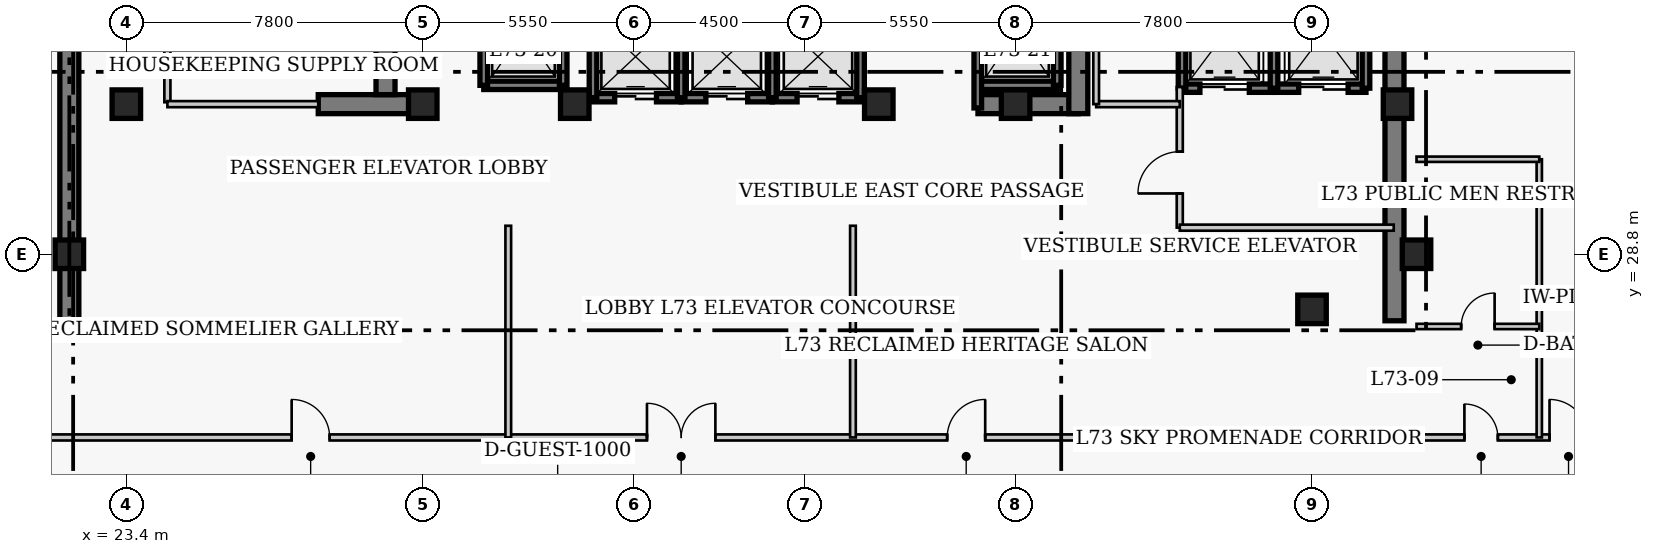
"""IFC4 building model, lengths in metres.
Left out: names, types, materials, properties, quantities, classifications, styles, units other than length and angle.
Written with IfcOpenShell. Run it as: python <this file> out.ifc"""

import sys

from ifc_helpers import new_model, si_unit, direction, frame, frame_2d, origin, origin_2d, place, context, subcontext, project, spatial, rectangle, extrude, element, fill, save


model = new_model("IFC4")
c1 = context("Model", 3, precision=1e-05, world=origin(), true_north=direction((0.0, 1.0)))
c2 = subcontext(c1, "Body", "Model", "MODEL_VIEW")
j1 = project(units=[si_unit("LENGTHUNIT", "METRE"), si_unit("PLANEANGLEUNIT", "RADIAN")], contexts=[c1])
p1 = place(None, origin())
s1 = spatial("IfcSite", under=j1, at=p1, CompositionType="ELEMENT")
p2 = place(p1, origin())
s2 = spatial("IfcBuilding", under=s1, at=p2, CompositionType="ELEMENT")
p3 = place(p2, frame((0.0, 0.0, 293.4)))
s3 = spatial("IfcBuildingStorey", under=s2, at=p3, CompositionType="ELEMENT", Elevation=293.4)
for number, where, z_axis, x_axis in (
    (1, (21.9, 27.05, 0.0), (0.0, 0.0, 1.0), (0.0, 1.0, 0.0)),
    (2, (56.77, 27.05, 0.0), (0.0, 0.0, 1.0), (0.0, 1.0, 0.0)),
):
    element("IfcWall", number, at=place(p3, frame(where, z_axis=z_axis, x_axis=x_axis)), inside=s3, PredefinedType="SHEAR", context=c2, shape_type="SweptSolid", body=[
        extrude(rectangle(XDim=13.52, YDim=0.5, at=frame_2d((6.76, 0.0))), origin(), (0.0, 0.0, 1.0), 4.0),
    ])
p4 = place(p3, frame((28.45, 32.75, 0.0), z_axis=(0.0, 0.0, 1.0), x_axis=(1.0, 0.0, 0.0)))
e3 = element("IfcWall", 3, at=p4, inside=s3, PredefinedType="SHEAR", context=c2, shape_type="SweptSolid", body=[
    extrude(rectangle(XDim=2.4, YDim=0.5, at=frame_2d((1.2, 0.0))), origin(), (0.0, 0.0, 1.0), 4.0),
])
p5 = place(p3, frame((45.81, 32.75, 0.0), z_axis=(0.0, 0.0, 1.0), x_axis=(1.0, 0.0, 0.0)))
e4 = element("IfcWall", 4, at=p5, inside=s3, PredefinedType="SHEAR", context=c2, shape_type="SweptSolid", body=[
    extrude(rectangle(XDim=2.64, YDim=0.5, at=frame_2d((1.32, 0.0))), origin(), (0.0, 0.0, 1.0), 4.0),
])
p6 = place(p3, frame((30.22, 33.0, 0.0), z_axis=(0.0, 0.0, 1.0), x_axis=(0.0, 1.0, 0.0)))
e5 = element("IfcWall", 5, at=p6, inside=s3, PredefinedType="SHEAR", context=c2, shape_type="SweptSolid", body=[
    extrude(rectangle(XDim=7.32, YDim=0.5, at=frame_2d((3.66, 0.0))), origin(), (0.0, 0.0, 1.0), 4.0),
])
p7 = place(p3, frame((48.45, 32.5, 0.0), z_axis=(0.0, 0.0, 1.0), x_axis=(0.0, 1.0, 0.0)))
e6 = element("IfcWall", 6, at=p7, inside=s3, PredefinedType="SHEAR", context=c2, shape_type="SweptSolid", body=[
    extrude(rectangle(XDim=7.82, YDim=0.5, at=frame_2d((3.91, 0.0))), origin(), (0.0, 0.0, 1.0), 4.0),
])
p8 = place(p7, frame((5.65, 0.0, 0.0)))
e7 = element("IfcOpeningElement", 7, at=p8, cuts=e6, PredefinedType="OPENING", context=c2, shape_type="SweptSolid", body=[
    extrude(rectangle(XDim=1.2, YDim=2.15, at=frame_2d((0.6, 1.075))), frame((0.0, 0.26, 0.0), z_axis=(0.0, -1.0, 0.0), x_axis=(1.0, 0.0, 0.0)), (0.0, 0.0, 1.0), 0.52),
])
for number, where, z_axis, x_axis in (
    (8, (21.9, 28.8, 0.0), (0.0, 0.0, 1.0), (1.0, 0.0, 0.0)),
    (9, (57.35, 28.8, 0.0), (0.0, 0.0, 1.0), (1.0, 0.0, 0.0)),
    (10, (23.4, 32.75, 0.0), (0.0, 0.0, 1.0), (1.0, 0.0, 0.0)),
    (11, (31.2, 32.75, 0.0), (0.0, 0.0, 1.0), (1.0, 0.0, 0.0)),
    (12, (35.2, 32.75, 0.0), (0.0, 0.0, 1.0), (1.0, 0.0, 0.0)),
    (13, (43.2, 32.75, 0.0), (0.0, 0.0, 1.0), (1.0, 0.0, 0.0)),
    (14, (46.8, 32.75, 0.0), (0.0, 0.0, 1.0), (1.0, 0.0, 0.0)),
    (15, (54.6, 27.35, 0.0), (0.0, 0.0, 1.0), (1.0, 0.0, 0.0)),
    (16, (56.85, 32.75, 0.0), (0.0, 0.0, 1.0), (1.0, 0.0, 0.0)),
):
    element("IfcColumn", number, at=place(p3, frame(where, z_axis=z_axis, x_axis=x_axis)), inside=s3, PredefinedType="COLUMN", context=c2, shape_type="SweptSolid", body=[
        extrude(rectangle(XDim=0.75, YDim=0.75, at=origin_2d()), origin(), (0.0, 0.0, 1.0), 4.0),
    ])
p9 = place(p3, frame((35.68, 32.92, 0.0), z_axis=(0.0, 0.0, 1.0), x_axis=(1.0, 0.0, 0.0)))
e17 = element("IfcWall", 17, at=p9, inside=s3, PredefinedType="SHEAR", context=c2, shape_type="SweptSolid", body=[
    extrude(rectangle(XDim=2.32, YDim=0.22, at=frame_2d((1.16, 0.0))), origin(), (0.0, 0.0, 1.0), 4.0),
])
p10 = place(p9, frame((0.57, 0.0, 0.0)))
e18 = element("IfcOpeningElement", 18, at=p10, cuts=e17, PredefinedType="OPENING", context=c2, shape_type="SweptSolid", body=[
    extrude(rectangle(XDim=1.1, YDim=2.15, at=frame_2d((0.55, 1.075))), frame((0.0, 0.12, 0.0), z_axis=(0.0, -1.0, 0.0), x_axis=(1.0, 0.0, 0.0)), (0.0, 0.0, 1.0), 0.24),
])
p11 = place(p3, frame((35.68, 32.92, 0.0), z_axis=(0.0, 0.0, 1.0), x_axis=(0.0, 1.0, 0.0)))
e19 = element("IfcWall", 19, at=p11, inside=s3, PredefinedType="SHEAR", context=c2, shape_type="SweptSolid", body=[
    extrude(rectangle(XDim=2.16, YDim=0.2, at=frame_2d((1.08, 0.0))), origin(), (0.0, 0.0, 1.0), 4.0),
])
p12 = place(p3, frame((38.0, 32.92, 0.0), z_axis=(0.0, 0.0, 1.0), x_axis=(1.0, 0.0, 0.0)))
e20 = element("IfcWall", 20, at=p12, inside=s3, PredefinedType="SHEAR", context=c2, shape_type="SweptSolid", body=[
    extrude(rectangle(XDim=2.4, YDim=0.22, at=frame_2d((1.2, 0.0))), origin(), (0.0, 0.0, 1.0), 4.0),
])
p13 = place(p12, frame((0.65, 0.0, 0.0)))
e21 = element("IfcOpeningElement", 21, at=p13, cuts=e20, PredefinedType="OPENING", context=c2, shape_type="SweptSolid", body=[
    extrude(rectangle(XDim=1.1, YDim=2.15, at=frame_2d((0.55, 1.075))), frame((0.0, 0.12, 0.0), z_axis=(0.0, -1.0, 0.0), x_axis=(1.0, 0.0, 0.0)), (0.0, 0.0, 1.0), 0.24),
])
p14 = place(p3, frame((38.0, 32.92, 0.0), z_axis=(0.0, 0.0, 1.0), x_axis=(0.0, 1.0, 0.0)))
e22 = element("IfcWall", 22, at=p14, inside=s3, PredefinedType="SHEAR", context=c2, shape_type="SweptSolid", body=[
    extrude(rectangle(XDim=2.16, YDim=0.2, at=frame_2d((1.08, 0.0))), origin(), (0.0, 0.0, 1.0), 4.0),
])
p15 = place(p3, frame((40.4, 32.92, 0.0), z_axis=(0.0, 0.0, 1.0), x_axis=(1.0, 0.0, 0.0)))
e23 = element("IfcWall", 23, at=p15, inside=s3, PredefinedType="SHEAR", context=c2, shape_type="SweptSolid", body=[
    extrude(rectangle(XDim=2.32, YDim=0.22, at=frame_2d((1.16, 0.0))), origin(), (0.0, 0.0, 1.0), 4.0),
])
p16 = place(p15, frame((0.65, 0.0, 0.0)))
e24 = element("IfcOpeningElement", 24, at=p16, cuts=e23, PredefinedType="OPENING", context=c2, shape_type="SweptSolid", body=[
    extrude(rectangle(XDim=1.1, YDim=2.15, at=frame_2d((0.55, 1.075))), frame((0.0, 0.12, 0.0), z_axis=(0.0, -1.0, 0.0), x_axis=(1.0, 0.0, 0.0)), (0.0, 0.0, 1.0), 0.24),
])
for number, where, z_axis, x_axis in (
    (25, (40.4, 32.92, 0.0), (0.0, 0.0, 1.0), (0.0, 1.0, 0.0)),
    (26, (42.72, 32.92, 0.0), (0.0, 0.0, 1.0), (0.0, 1.0, 0.0)),
):
    element("IfcWall", number, at=place(p3, frame(where, z_axis=z_axis, x_axis=x_axis)), inside=s3, PredefinedType="SHEAR", context=c2, shape_type="SweptSolid", body=[
        extrude(rectangle(XDim=2.16, YDim=0.2, at=frame_2d((1.08, 0.0))), origin(), (0.0, 0.0, 1.0), 4.0),
    ])
p17 = place(p3, frame((51.18, 33.17, 0.0), z_axis=(0.0, 0.0, 1.0), x_axis=(1.0, 0.0, 0.0)))
e27 = element("IfcWall", 27, at=p17, inside=s3, PredefinedType="SHEAR", context=c2, shape_type="SweptSolid", body=[
    extrude(rectangle(XDim=2.42, YDim=0.22, at=frame_2d((1.21, 0.0))), origin(), (0.0, 0.0, 1.0), 4.0),
])
p18 = place(p17, frame((0.47, 0.0, 0.0)))
e28 = element("IfcOpeningElement", 28, at=p18, cuts=e27, PredefinedType="OPENING", context=c2, shape_type="SweptSolid", body=[
    extrude(rectangle(XDim=1.3, YDim=2.15, at=frame_2d((0.65, 1.075))), frame((0.0, 0.12, 0.0), z_axis=(0.0, -1.0, 0.0), x_axis=(1.0, 0.0, 0.0)), (0.0, 0.0, 1.0), 0.24),
])
p19 = place(p3, frame((51.18, 33.17, 0.0), z_axis=(0.0, 0.0, 1.0), x_axis=(0.0, 1.0, 0.0)))
e29 = element("IfcWall", 29, at=p19, inside=s3, PredefinedType="SHEAR", context=c2, shape_type="SweptSolid", body=[
    extrude(rectangle(XDim=2.86, YDim=0.2, at=frame_2d((1.43, 0.0))), origin(), (0.0, 0.0, 1.0), 4.0),
])
p20 = place(p3, frame((53.6, 33.17, 0.0), z_axis=(0.0, 0.0, 1.0), x_axis=(1.0, 0.0, 0.0)))
e30 = element("IfcWall", 30, at=p20, inside=s3, PredefinedType="SHEAR", context=c2, shape_type="SweptSolid", body=[
    extrude(rectangle(XDim=2.42, YDim=0.22, at=frame_2d((1.21, 0.0))), origin(), (0.0, 0.0, 1.0), 4.0),
])
p21 = place(p20, frame((0.65, 0.0, 0.0)))
e31 = element("IfcOpeningElement", 31, at=p21, cuts=e30, PredefinedType="OPENING", context=c2, shape_type="SweptSolid", body=[
    extrude(rectangle(XDim=1.3, YDim=2.15, at=frame_2d((0.65, 1.075))), frame((0.0, 0.12, 0.0), z_axis=(0.0, -1.0, 0.0), x_axis=(1.0, 0.0, 0.0)), (0.0, 0.0, 1.0), 0.24),
])
for number, where, z_axis, x_axis in (
    (32, (53.6, 33.17, 0.0), (0.0, 0.0, 1.0), (0.0, 1.0, 0.0)),
    (33, (56.02, 33.17, 0.0), (0.0, 0.0, 1.0), (0.0, 1.0, 0.0)),
):
    element("IfcWall", number, at=place(p3, frame(where, z_axis=z_axis, x_axis=x_axis)), inside=s3, PredefinedType="SHEAR", context=c2, shape_type="SweptSolid", body=[
        extrude(rectangle(XDim=2.86, YDim=0.2, at=frame_2d((1.43, 0.0))), origin(), (0.0, 0.0, 1.0), 4.0),
    ])
p22 = place(p3, frame((32.805, 33.245, 0.0), z_axis=(0.0, 0.0, 1.0), x_axis=(1.0, 0.0, 0.0)))
e34 = element("IfcWall", 34, at=p22, inside=s3, PredefinedType="SHEAR", context=c2, shape_type="SweptSolid", body=[
    extrude(rectangle(XDim=2.09, YDim=0.22, at=frame_2d((1.045, 0.0))), origin(), (0.0, 0.0, 1.0), 4.0),
])
for number, where, z_axis, x_axis in (
    (35, (32.805, 33.245, 0.0), (0.0, 0.0, 1.0), (0.0, 1.0, 0.0)),
    (36, (34.895, 33.245, 0.0), (0.0, 0.0, 1.0), (0.0, 1.0, 0.0)),
):
    element("IfcWall", number, at=place(p3, frame(where, z_axis=z_axis, x_axis=x_axis)), inside=s3, PredefinedType="SHEAR", context=c2, shape_type="SweptSolid", body=[
        extrude(rectangle(XDim=2.91, YDim=0.2, at=frame_2d((1.455, 0.0))), origin(), (0.0, 0.0, 1.0), 4.0),
    ])
p23 = place(p3, frame((45.805, 33.245, 0.0), z_axis=(0.0, 0.0, 1.0), x_axis=(1.0, 0.0, 0.0)))
e37 = element("IfcWall", 37, at=p23, inside=s3, PredefinedType="SHEAR", context=c2, shape_type="SweptSolid", body=[
    extrude(rectangle(XDim=2.09, YDim=0.22, at=frame_2d((1.045, 0.0))), origin(), (0.0, 0.0, 1.0), 4.0),
])
p24 = place(p3, frame((45.805, 32.65, 0.0), z_axis=(0.0, 0.0, 1.0), x_axis=(0.0, 1.0, 0.0)))
e38 = element("IfcWall", 38, at=p24, inside=s3, PredefinedType="SHEAR", context=c2, shape_type="SweptSolid", body=[
    extrude(rectangle(XDim=3.505, YDim=0.2, at=frame_2d((1.752, 0.0))), origin(), (0.0, 0.0, 1.0), 4.0),
])
p25 = place(p3, frame((47.895, 33.245, 0.0), z_axis=(0.0, 0.0, 1.0), x_axis=(0.0, 1.0, 0.0)))
e39 = element("IfcWall", 39, at=p25, inside=s3, PredefinedType="SHEAR", context=c2, shape_type="SweptSolid", body=[
    extrude(rectangle(XDim=2.91, YDim=0.2, at=frame_2d((1.455, 0.0))), origin(), (0.0, 0.0, 1.0), 4.0),
])
p26 = place(p3, frame((24.48, 32.8, 0.0), z_axis=(0.0, 0.0, 1.0), x_axis=(0.0, 1.0, 0.0)))
e40 = element("IfcWall", 40, at=p26, inside=s3, PredefinedType="PARTITIONING", context=c2, shape_type="SweptSolid", body=[
    extrude(rectangle(XDim=3.57, YDim=0.16, at=frame_2d((1.785, 0.0))), origin(), (0.0, 0.0, 1.0), 3.71),
])
p27 = place(p26, frame((1.604, 0.0, 0.0)))
e41 = element("IfcOpeningElement", 41, at=p27, cuts=e40, PredefinedType="OPENING", context=c2, shape_type="SweptSolid", body=[
    extrude(rectangle(XDim=0.9, YDim=2.1, at=frame_2d((0.45, 1.05))), frame((0.0, 0.09, 0.0), z_axis=(0.0, -1.0, 0.0), x_axis=(1.0, 0.0, 0.0)), (0.0, 0.0, 1.0), 0.18),
])
p28 = place(p3, frame((51.12, 29.5, 0.0), z_axis=(0.0, 0.0, 1.0), x_axis=(0.0, 1.0, 0.0)))
e42 = element("IfcWall", 42, at=p28, inside=s3, PredefinedType="PARTITIONING", context=c2, shape_type="SweptSolid", body=[
    extrude(rectangle(XDim=3.7, YDim=0.16, at=frame_2d((1.85, 0.0))), origin(), (0.0, 0.0, 1.0), 3.71),
])
p29 = place(p28, frame((0.9, 0.0, 0.0)))
e43 = element("IfcOpeningElement", 43, at=p29, cuts=e42, PredefinedType="OPENING", context=c2, shape_type="SweptSolid", body=[
    extrude(rectangle(XDim=1.1, YDim=2.15, at=frame_2d((0.55, 1.075))), frame((0.0, 0.09, 0.0), z_axis=(0.0, -1.0, 0.0), x_axis=(1.0, 0.0, 0.0)), (0.0, 0.0, 1.0), 0.18),
])
p30 = place(p3, frame((51.12, 29.5, 0.0), z_axis=(0.0, 0.0, 1.0), x_axis=(1.0, 0.0, 0.0)))
e44 = element("IfcWall", 44, at=p30, inside=s3, PredefinedType="PARTITIONING", context=c2, shape_type="SweptSolid", body=[
    extrude(rectangle(XDim=5.63, YDim=0.16, at=frame_2d((2.815, 0.0))), origin(), (0.0, 0.0, 1.0), 3.71),
])
p31 = place(p3, frame((24.48, 32.75, 0.0), z_axis=(0.0, 0.0, 1.0), x_axis=(1.0, 0.0, 0.0)))
e45 = element("IfcWall", 45, at=p31, inside=s3, PredefinedType="PARTITIONING", context=c2, shape_type="SweptSolid", body=[
    extrude(rectangle(XDim=3.97, YDim=0.16, at=frame_2d((1.985, 0.0))), origin(), (0.0, 0.0, 1.0), 3.71),
])
p32 = place(p3, frame((48.92, 32.75, 0.0), z_axis=(0.0, 0.0, 1.0), x_axis=(1.0, 0.0, 0.0)))
e46 = element("IfcWall", 46, at=p32, inside=s3, PredefinedType="PARTITIONING", context=c2, shape_type="SweptSolid", body=[
    extrude(rectangle(XDim=2.2, YDim=0.16, at=frame_2d((1.1, 0.0))), origin(), (0.0, 0.0, 1.0), 3.71),
])
p33 = place(p3, frame((48.92, 32.75, 0.0), z_axis=(0.0, 0.0, 1.0), x_axis=(0.0, 1.0, 0.0)))
e47 = element("IfcWall", 47, at=p33, inside=s3, PredefinedType="PARTITIONING", context=c2, shape_type="SweptSolid", body=[
    extrude(rectangle(XDim=3.62, YDim=0.15, at=frame_2d((1.81, 0.0))), origin(), (0.0, 0.0, 1.0), 3.71),
])
p34 = place(p3, frame((8.1, 23.98, 0.0), z_axis=(0.0, 0.0, 1.0), x_axis=(1.0, 0.0, 0.0)))
e48 = element("IfcWall", 48, at=p34, inside=s3, PredefinedType="PARTITIONING", context=c2, shape_type="SweptSolid", body=[
    extrude(rectangle(XDim=61.8, YDim=0.16, at=frame_2d((30.9, 0.0))), origin(), (0.0, 0.0, 1.0), 3.71),
])
p35 = place(p34, frame((29.0, 0.0, 0.0)))
e49 = element("IfcOpeningElement", 49, at=p35, cuts=e48, PredefinedType="OPENING", context=c2, shape_type="SweptSolid", body=[
    extrude(rectangle(XDim=1.8, YDim=2.2, at=frame_2d((0.9, 1.1))), frame((0.0, 0.09, 0.0), z_axis=(0.0, -1.0, 0.0), x_axis=(1.0, 0.0, 0.0)), (0.0, 0.0, 1.0), 0.18),
])
p36 = place(p34, frame((19.65, 0.0, 0.0)))
e50 = element("IfcOpeningElement", 50, at=p36, cuts=e48, PredefinedType="OPENING", context=c2, shape_type="SweptSolid", body=[
    extrude(rectangle(XDim=1.0, YDim=2.15, at=frame_2d((0.5, 1.075))), frame((0.0, 0.09, 0.0), z_axis=(0.0, -1.0, 0.0), x_axis=(1.0, 0.0, 0.0)), (0.0, 0.0, 1.0), 0.18),
])
p37 = place(p34, frame((36.9, 0.0, 0.0)))
e51 = element("IfcOpeningElement", 51, at=p37, cuts=e48, PredefinedType="OPENING", context=c2, shape_type="SweptSolid", body=[
    extrude(rectangle(XDim=1.0, YDim=2.15, at=frame_2d((0.5, 1.075))), frame((0.0, 0.09, 0.0), z_axis=(0.0, -1.0, 0.0), x_axis=(1.0, 0.0, 0.0)), (0.0, 0.0, 1.0), 0.18),
])
p38 = place(p34, frame((6.35, 0.0, 0.0)))
e52 = element("IfcOpeningElement", 52, at=p38, cuts=e48, PredefinedType="OPENING", context=c2, shape_type="SweptSolid", body=[
    extrude(rectangle(XDim=1.0, YDim=2.15, at=frame_2d((0.5, 1.075))), frame((0.0, 0.09, 0.0), z_axis=(0.0, -1.0, 0.0), x_axis=(1.0, 0.0, 0.0)), (0.0, 0.0, 1.0), 0.18),
])
p39 = place(p34, frame((50.51, 0.0, 0.0)))
e53 = element("IfcOpeningElement", 53, at=p39, cuts=e48, PredefinedType="OPENING", context=c2, shape_type="SweptSolid", body=[
    extrude(rectangle(XDim=0.88, YDim=2.05, at=frame_2d((0.44, 1.025))), frame((0.0, 0.09, 0.0), z_axis=(0.0, -1.0, 0.0), x_axis=(1.0, 0.0, 0.0)), (0.0, 0.0, 1.0), 0.18),
])
p40 = place(p34, frame((52.75, 0.0, 0.0)))
e54 = element("IfcOpeningElement", 54, at=p40, cuts=e48, PredefinedType="OPENING", context=c2, shape_type="SweptSolid", body=[
    extrude(rectangle(XDim=1.0, YDim=2.15, at=frame_2d((0.5, 1.075))), frame((0.0, 0.09, 0.0), z_axis=(0.0, -1.0, 0.0), x_axis=(1.0, 0.0, 0.0)), (0.0, 0.0, 1.0), 0.18),
])
for number, where, z_axis, x_axis in (
    (55, (33.45, 23.98, 0.0), (0.0, 0.0, 1.0), (0.0, 1.0, 0.0)),
    (56, (42.52, 23.98, 0.0), (0.0, 0.0, 1.0), (0.0, 1.0, 0.0)),
):
    element("IfcWall", number, at=place(p3, frame(where, z_axis=z_axis, x_axis=x_axis)), inside=s3, PredefinedType="PARTITIONING", context=c2, shape_type="SweptSolid", body=[
        extrude(rectangle(XDim=5.57, YDim=0.15, at=frame_2d((2.785, 0.0))), origin(), (0.0, 0.0, 1.0), 3.71),
    ])
p41 = place(p3, frame((60.58, 23.98, 0.0), z_axis=(0.0, 0.0, 1.0), x_axis=(0.0, 1.0, 0.0)))
e57 = element("IfcWall", 57, at=p41, inside=s3, PredefinedType="PLUMBINGWALL", context=c2, shape_type="SweptSolid", body=[
    extrude(rectangle(XDim=7.32, YDim=0.14, at=frame_2d((3.66, 0.0))), origin(), (0.0, 0.0, 1.0), 3.71),
])
p42 = place(p3, frame((57.35, 26.9, 0.0), z_axis=(0.0, 0.0, 1.0), x_axis=(1.0, 0.0, 0.0)))
e58 = element("IfcWall", 58, at=p42, inside=s3, PredefinedType="PLUMBINGWALL", context=c2, shape_type="SweptSolid", body=[
    extrude(rectangle(XDim=3.23, YDim=0.14, at=frame_2d((1.615, 0.0))), origin(), (0.0, 0.0, 1.0), 3.71),
])
p43 = place(p42, frame((1.175, 0.0, 0.0)))
e59 = element("IfcOpeningElement", 59, at=p43, cuts=e58, PredefinedType="OPENING", context=c2, shape_type="SweptSolid", body=[
    extrude(rectangle(XDim=0.88, YDim=2.05, at=frame_2d((0.44, 1.025))), frame((0.0, 0.08, 0.0), z_axis=(0.0, -1.0, 0.0), x_axis=(1.0, 0.0, 0.0)), (0.0, 0.0, 1.0), 0.16),
])
p44 = place(p3, frame((57.35, 31.3, 0.0), z_axis=(0.0, 0.0, 1.0), x_axis=(1.0, 0.0, 0.0)))
e60 = element("IfcWall", 60, at=p44, inside=s3, PredefinedType="PLUMBINGWALL", context=c2, shape_type="SweptSolid", body=[
    extrude(rectangle(XDim=3.23, YDim=0.14, at=frame_2d((1.615, 0.0))), origin(), (0.0, 0.0, 1.0), 3.71),
])
p45 = place(p10, origin())
e61 = element("IfcDoor", 61, at=p45, inside=s3, OperationType="DOUBLE_DOOR_SLIDING", PredefinedType="DOOR", context=c2, shape_type="SweptSolid", body=[
    extrude(rectangle(XDim=1.1, YDim=2.15, at=frame_2d((0.55, 1.075))), frame((0.0, 0.025, 0.0), z_axis=(0.0, -1.0, 0.0), x_axis=(1.0, 0.0, 0.0)), (0.0, 0.0, 1.0), 0.05),
])
fill(e18, e61)
p46 = place(p13, origin())
e62 = element("IfcDoor", 62, at=p46, inside=s3, OperationType="DOUBLE_DOOR_SLIDING", PredefinedType="DOOR", context=c2, shape_type="SweptSolid", body=[
    extrude(rectangle(XDim=1.1, YDim=2.15, at=frame_2d((0.55, 1.075))), frame((0.0, 0.025, 0.0), z_axis=(0.0, -1.0, 0.0), x_axis=(1.0, 0.0, 0.0)), (0.0, 0.0, 1.0), 0.05),
])
fill(e21, e62)
p47 = place(p16, origin())
e63 = element("IfcDoor", 63, at=p47, inside=s3, OperationType="DOUBLE_DOOR_SLIDING", PredefinedType="DOOR", context=c2, shape_type="SweptSolid", body=[
    extrude(rectangle(XDim=1.1, YDim=2.15, at=frame_2d((0.55, 1.075))), frame((0.0, 0.025, 0.0), z_axis=(0.0, -1.0, 0.0), x_axis=(1.0, 0.0, 0.0)), (0.0, 0.0, 1.0), 0.05),
])
fill(e24, e63)
p48 = place(p18, origin())
e64 = element("IfcDoor", 64, at=p48, inside=s3, OperationType="DOUBLE_DOOR_SLIDING", PredefinedType="DOOR", context=c2, shape_type="SweptSolid", body=[
    extrude(rectangle(XDim=1.3, YDim=2.15, at=frame_2d((0.65, 1.075))), frame((0.0, 0.025, 0.0), z_axis=(0.0, -1.0, 0.0), x_axis=(1.0, 0.0, 0.0)), (0.0, 0.0, 1.0), 0.05),
])
fill(e28, e64)
p49 = place(p21, origin())
e65 = element("IfcDoor", 65, at=p49, inside=s3, OperationType="DOUBLE_DOOR_SLIDING", PredefinedType="DOOR", context=c2, shape_type="SweptSolid", body=[
    extrude(rectangle(XDim=1.3, YDim=2.15, at=frame_2d((0.65, 1.075))), frame((0.0, 0.025, 0.0), z_axis=(0.0, -1.0, 0.0), x_axis=(1.0, 0.0, 0.0)), (0.0, 0.0, 1.0), 0.05),
])
fill(e31, e65)
p50 = place(p29, origin())
e66 = element("IfcDoor", 66, at=p50, inside=s3, OperationType="SINGLE_SWING_LEFT", PredefinedType="DOOR", context=c2, shape_type="SweptSolid", body=[
    extrude(rectangle(XDim=1.1, YDim=2.15, at=frame_2d((0.55, 1.075))), frame((0.0, 0.025, 0.0), z_axis=(0.0, -1.0, 0.0), x_axis=(1.0, 0.0, 0.0)), (0.0, 0.0, 1.0), 0.05),
])
fill(e43, e66)
p51 = place(p35, origin())
e67 = element("IfcDoor", 67, at=p51, inside=s3, OperationType="DOUBLE_DOOR_SINGLE_SWING", PredefinedType="DOOR", context=c2, shape_type="SweptSolid", body=[
    extrude(rectangle(XDim=1.8, YDim=2.2, at=frame_2d((0.9, 1.1))), frame((0.0, 0.025, 0.0), z_axis=(0.0, -1.0, 0.0), x_axis=(1.0, 0.0, 0.0)), (0.0, 0.0, 1.0), 0.05),
])
fill(e49, e67)
p52 = place(p36, origin())
e68 = element("IfcDoor", 68, at=p52, inside=s3, OperationType="SINGLE_SWING_LEFT", PredefinedType="DOOR", context=c2, shape_type="SweptSolid", body=[
    extrude(rectangle(XDim=1.0, YDim=2.15, at=frame_2d((0.5, 1.075))), frame((0.0, 0.025, 0.0), z_axis=(0.0, -1.0, 0.0), x_axis=(1.0, 0.0, 0.0)), (0.0, 0.0, 1.0), 0.05),
])
fill(e50, e68)
p53 = place(p37, origin())
e69 = element("IfcDoor", 69, at=p53, inside=s3, OperationType="SINGLE_SWING_RIGHT", PredefinedType="DOOR", context=c2, shape_type="SweptSolid", body=[
    extrude(rectangle(XDim=1.0, YDim=2.15, at=frame_2d((0.5, 1.075))), frame((0.0, 0.025, 0.0), z_axis=(0.0, -1.0, 0.0), x_axis=(1.0, 0.0, 0.0)), (0.0, 0.0, 1.0), 0.05),
])
fill(e51, e69)
p54 = place(p39, origin())
e70 = element("IfcDoor", 70, at=p54, inside=s3, OperationType="SINGLE_SWING_LEFT", PredefinedType="DOOR", context=c2, shape_type="SweptSolid", body=[
    extrude(rectangle(XDim=0.88, YDim=2.05, at=frame_2d((0.44, 1.025))), frame((0.0, 0.025, 0.0), z_axis=(0.0, -1.0, 0.0), x_axis=(1.0, 0.0, 0.0)), (0.0, 0.0, 1.0), 0.05),
])
fill(e53, e70)
p55 = place(p43, origin())
e71 = element("IfcDoor", 71, at=p55, inside=s3, OperationType="SINGLE_SWING_RIGHT", PredefinedType="DOOR", context=c2, shape_type="SweptSolid", body=[
    extrude(rectangle(XDim=0.88, YDim=2.05, at=frame_2d((0.44, 1.025))), frame((0.0, 0.025, 0.0), z_axis=(0.0, -1.0, 0.0), x_axis=(1.0, 0.0, 0.0)), (0.0, 0.0, 1.0), 0.05),
])
fill(e59, e71)
p56 = place(p40, origin())
e72 = element("IfcDoor", 72, at=p56, inside=s3, OperationType="SINGLE_SWING_LEFT", PredefinedType="DOOR", context=c2, shape_type="SweptSolid", body=[
    extrude(rectangle(XDim=1.0, YDim=2.15, at=frame_2d((0.5, 1.075))), frame((0.0, 0.025, 0.0), z_axis=(0.0, -1.0, 0.0), x_axis=(1.0, 0.0, 0.0)), (0.0, 0.0, 1.0), 0.05),
])
fill(e54, e72)
save(model, sys.argv[1])
